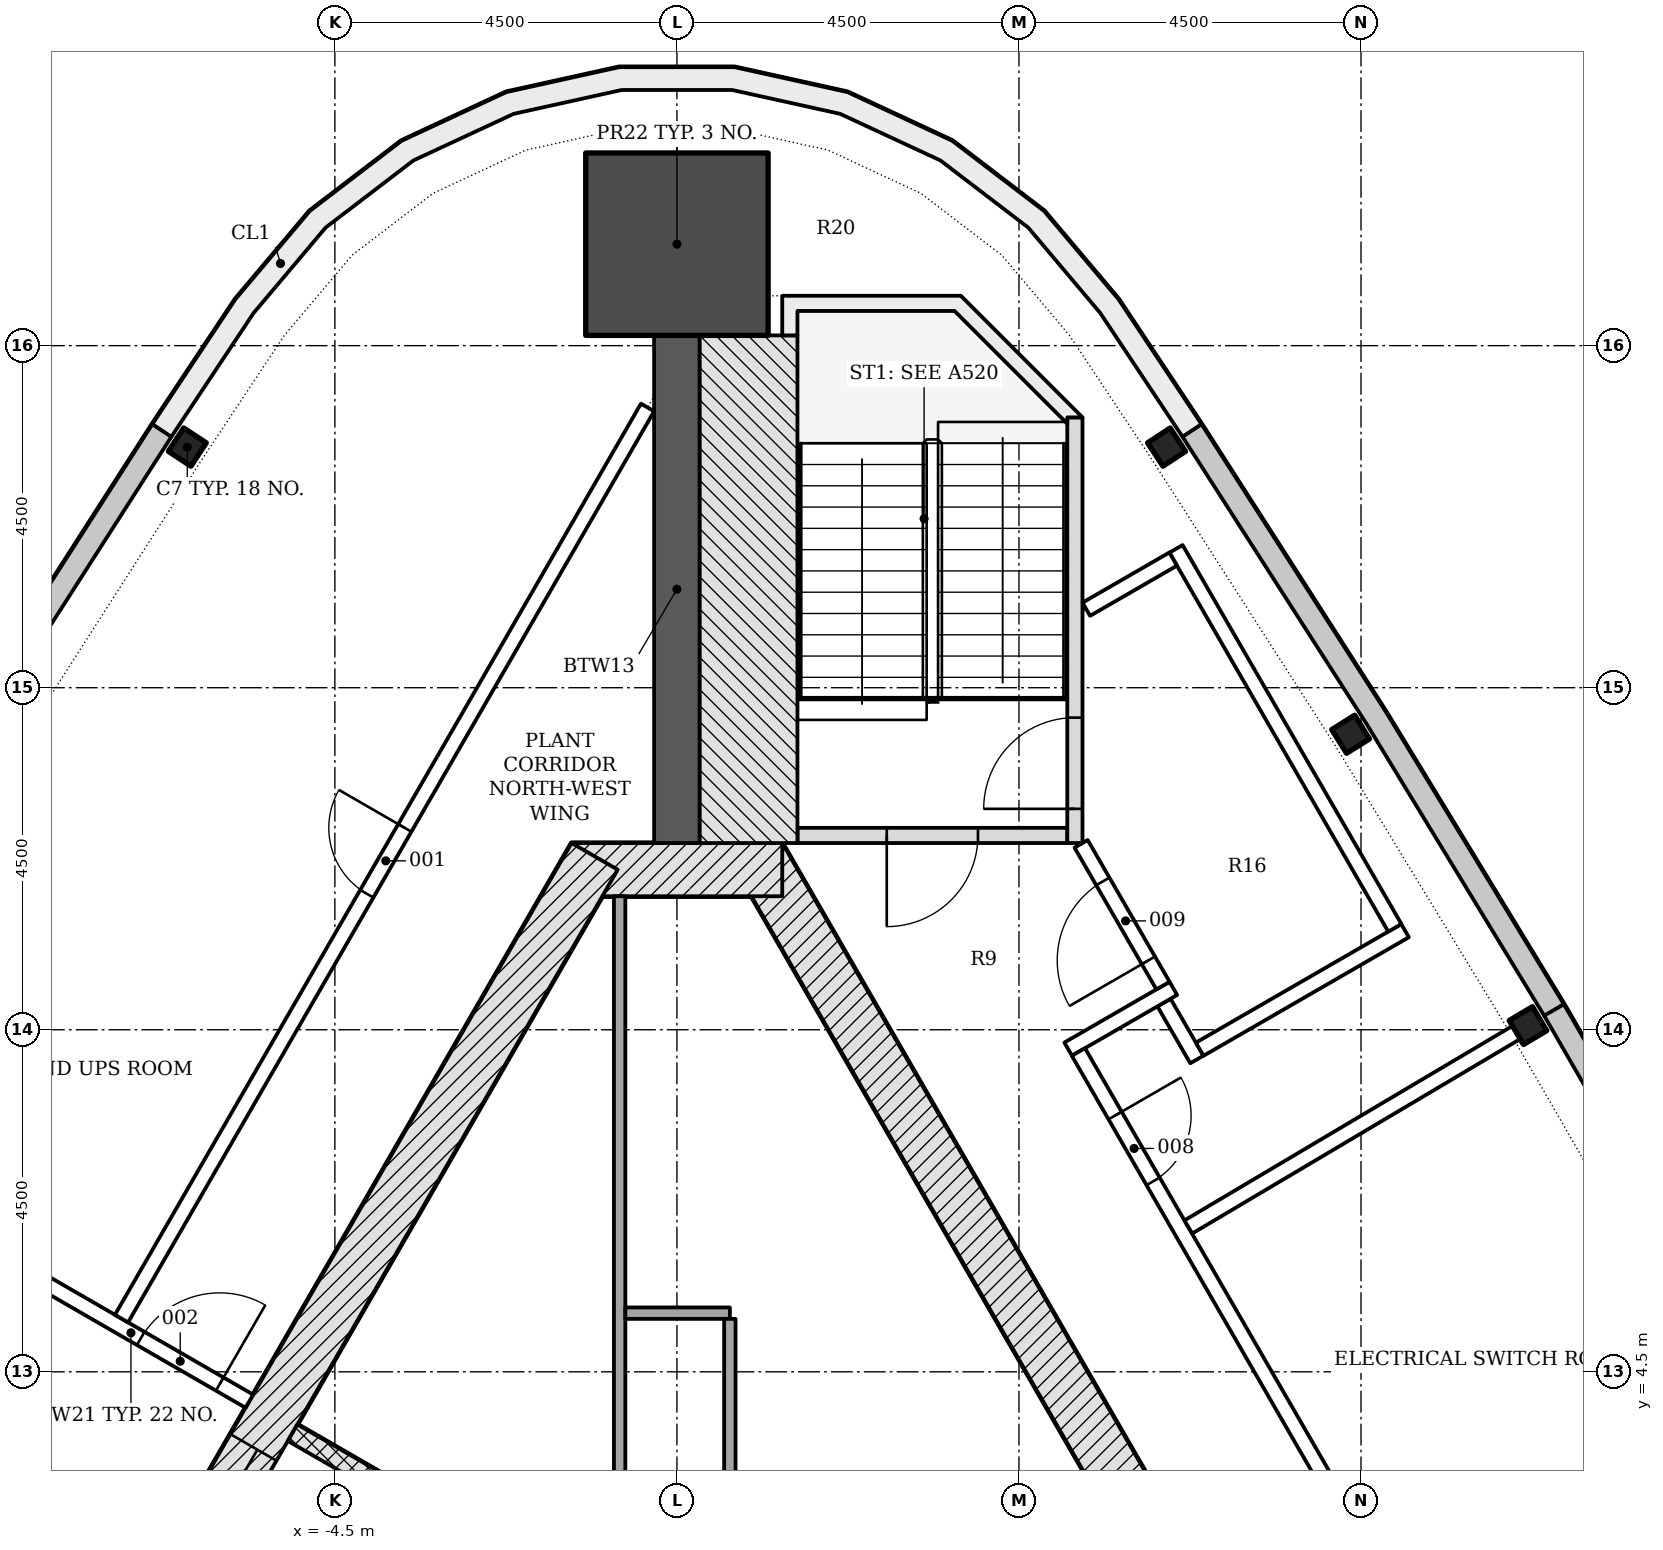
"""IFC4 building model, lengths in metres.
Left out: names, types, materials, properties, quantities, classifications, styles, units other than length and angle.
Written with IfcOpenShell. Run it as: python <this file> out.ifc"""

import sys

from ifc_helpers import new_model, si_unit, direction, frame, frame_2d, origin, origin_2d, place, context, subcontext, project, spatial, polyline, rectangle, i_section, outline, extrude, element, fill, save


model = new_model("IFC4")
c1 = context("Model", 3, precision=1e-05, world=origin(), true_north=direction((0.0, 1.0)))
c2 = subcontext(c1, "Body", "Model", "MODEL_VIEW")
j1 = project(units=[si_unit("LENGTHUNIT", "METRE"), si_unit("PLANEANGLEUNIT", "RADIAN")], contexts=[c1])
p1 = place(None, origin())
s1 = spatial("IfcSite", under=j1, at=p1, CompositionType="ELEMENT")
p2 = place(p1, origin())
s2 = spatial("IfcBuilding", under=s1, at=p2, CompositionType="ELEMENT")
p3 = place(p2, frame((0.0, 0.0, 279.6)))
s3 = spatial("IfcBuildingStorey", under=s2, at=p3, CompositionType="ELEMENT", Elevation=279.6)
p4 = place(p3, frame((10.311, -4.703, -0.25), z_axis=(0.0, 0.0, 1.0), x_axis=(-0.500001446645, 0.866024568562, 0.0)))
e1 = element("IfcWall", 1, at=p4, inside=s3, PredefinedType="SHEAR", context=c2, shape_type="SweptSolid", body=[
    extrude(rectangle(XDim=18.458, YDim=0.7, at=frame_2d((9.229, 0.0))), origin(), (0.0, 0.0, 1.0), 4.5),
])
p5 = place(p3, frame((1.386, 11.106, -0.25), z_axis=(0.0, 0.0, 1.0), x_axis=(-1.0, 0.0, 0.0)))
e2 = element("IfcWall", 2, at=p5, inside=s3, PredefinedType="SHEAR", context=c2, shape_type="SweptSolid", body=[
    extrude(rectangle(XDim=2.771, YDim=0.7, at=frame_2d((1.386, 0.0))), origin(), (0.0, 0.0, 1.0), 4.5),
])
p6 = place(p3, frame((-1.083, 11.281, -0.25), z_axis=(0.0, 0.0, 1.0), x_axis=(-0.500001446645, -0.866024568562, 0.0)))
e3 = element("IfcWall", 3, at=p6, inside=s3, PredefinedType="SHEAR", context=c2, shape_type="SweptSolid", body=[
    extrude(rectangle(XDim=18.458, YDim=0.7, at=frame_2d((9.229, 0.0))), origin(), (0.0, 0.0, 1.0), 4.5),
])
p7 = place(p6, frame((8.979, 0.0, 0.25)))
e4 = element("IfcOpeningElement", 4, at=p7, cuts=e3, PredefinedType="OPENING", context=c2, shape_type="SweptSolid", body=[
    extrude(rectangle(XDim=1.2, YDim=2.1, at=frame_2d((0.6, 1.05))), frame((0.0, 0.36, 0.0), z_axis=(0.0, -1.0, 0.0), x_axis=(1.0, 0.0, 0.0)), (0.0, 0.0, 1.0), 0.72),
])
p8 = place(p6, frame((11.029, 0.0, 0.25)))
e5 = element("IfcOpeningElement", 5, at=p8, cuts=e3, PredefinedType="OPENING", context=c2, shape_type="SweptSolid", body=[
    extrude(rectangle(XDim=1.2, YDim=2.1, at=frame_2d((0.6, 1.05))), frame((0.0, 0.36, 0.0), z_axis=(0.0, -1.0, 0.0), x_axis=(1.0, 0.0, 0.0)), (0.0, 0.0, 1.0), 0.72),
])
p9 = place(p3, frame((0.0, 11.456, -0.25), z_axis=(0.0, 0.0, 1.0), x_axis=(0.0, 1.0, 0.0)))
e6 = element("IfcWall", 6, at=p9, inside=s3, PredefinedType="SHEAR", context=c2, shape_type="SweptSolid", body=[
    extrude(rectangle(XDim=6.679, YDim=0.6, at=frame_2d((3.339, 0.0))), origin(), (0.0, 0.0, 1.0), 4.5),
])
p10 = place(p3, frame((0.0, 19.335, -0.25), z_axis=(0.0, 0.0, 1.0), x_axis=(0.0, 1.0, 0.0)))
e7 = element("IfcColumn", 7, at=p10, inside=s3, PredefinedType="COLUMN", context=c2, shape_type="SweptSolid", body=[
    extrude(rectangle(XDim=2.4, YDim=2.4, at=origin_2d()), origin(), (0.0, 0.0, 1.0), 4.5),
])
for number, where, z_axis, x_axis in (
    (8, (-6.442, 16.666, -0.25), (0.0, 0.0, 1.0), (-0.549, -0.836, 0.0)),
    (9, (11.196, 9.055, -0.25), (0.0, 0.0, 1.0), (-0.51, 0.86, 0.0)),
    (10, (8.863, 12.888, -0.25), (0.0, 0.0, 1.0), (-0.53, 0.848, 0.0)),
    (11, (6.442, 16.666, -0.25), (0.0, 0.0, 1.0), (-0.549, 0.836, 0.0)),
):
    element("IfcColumn", number, at=place(p3, frame(where, z_axis=z_axis, x_axis=x_axis)), inside=s3, PredefinedType="COLUMN", context=c2, shape_type="SweptSolid", body=[
        extrude(i_section(OverallWidth=0.368, OverallDepth=0.356, WebThickness=0.011, FlangeThickness=0.018, FilletRadius=0.015, at=origin_2d()), origin(), (0.0, 0.0, 1.0), 4.5),
    ])
p11 = place(p3, origin())
e12 = element("IfcWall", 12, at=p11, inside=s3, PredefinedType="NOTDEFINED", context=c2, shape_type="SweptSolid", body=[
    extrude(outline(polyline([(-6.901, 16.968), (-9.33, 13.179), (-11.669, 9.335), (-11.413, 9.179), (-9.075, 13.02), (-6.649, 16.806), (-6.901, 16.968)])), origin(), (0.0, 0.0, 1.0), 4.25),
])
p12 = place(p3, origin())
e13 = element("IfcWall", 13, at=p12, inside=s3, PredefinedType="NOTDEFINED", context=c2, shape_type="SweptSolid", body=[
    extrude(outline(polyline([(11.669, 9.335), (9.33, 13.179), (6.901, 16.968), (6.649, 16.806), (9.075, 13.02), (11.413, 9.179), (11.669, 9.335)])), origin(), (0.0, 0.0, 1.0), 4.25),
])
p13 = place(p3, origin())
e14 = element("IfcWall", 14, at=p13, inside=s3, PredefinedType="NOTDEFINED", context=c2, shape_type="SweptSolid", body=[
    extrude(outline(polyline([(13.919, 5.438), (11.669, 9.335), (11.409, 9.185), (13.659, 5.288), (13.919, 5.438)])), origin(), (0.0, 0.0, 1.0), 1.2),
])
p14 = place(p3, origin())
e15 = element("IfcWall", 15, at=p14, inside=s3, PredefinedType="NOTDEFINED", context=c2, shape_type="SweptSolid", body=[
    extrude(outline(polyline([(6.901, 16.968), (5.81, 18.61), (4.83, 19.771), (3.623, 20.695), (2.244, 21.335), (0.76, 21.664), (-0.76, 21.664), (-2.244, 21.335), (-3.623, 20.695), (-4.83, 19.771), (-5.81, 18.61), (-6.901, 16.968), (-6.651, 16.802), (-5.569, 18.429), (-4.622, 19.553), (-3.466, 20.437), (-2.147, 21.05), (-0.727, 21.364), (0.727, 21.364), (2.147, 21.05), (3.466, 20.437), (4.622, 19.553), (5.569, 18.429), (6.651, 16.802), (6.901, 16.968)])), origin(), (0.0, 0.0, 1.0), 4.25),
])
p15 = place(p3, frame((-5.056, 3.699, -0.25), z_axis=(0.0, 0.0, 1.0), x_axis=(0.866032775405, -0.499987231761, 0.0)))
e16 = element("IfcWall", 16, at=p15, inside=s3, PredefinedType="PARTITIONING", context=c2, shape_type="SweptSolid", body=[
    extrude(rectangle(XDim=2.9, YDim=0.25, at=frame_2d((1.45, 0.0))), origin(), (0.0, 0.0, 1.0), 4.5),
])
p16 = place(p3, frame((-0.754, 10.756, 0.0), z_axis=(0.0, 0.0, 1.0), x_axis=(0.0, -1.0, 0.0)))
e17 = element("IfcWall", 17, at=p16, inside=s3, PredefinedType="PARTITIONING", context=c2, shape_type="SweptSolid", body=[
    extrude(rectangle(XDim=16.985, YDim=0.15, at=frame_2d((8.492, 0.0))), origin(), (0.0, 0.0, 1.0), 4.25),
])
p17 = place(p16, frame((9.185, 0.0, 0.0)))
e18 = element("IfcOpeningElement", 18, at=p17, cuts=e17, PredefinedType="OPENING", context=c2, shape_type="SweptSolid", body=[
    extrude(rectangle(XDim=0.9, YDim=2.1, at=frame_2d((0.45, 1.05))), frame((0.0, 0.085, 0.0), z_axis=(0.0, -1.0, 0.0), x_axis=(1.0, 0.0, 0.0)), (0.0, 0.0, 1.0), 0.17),
])
p18 = place(p3, frame((-0.679, 5.272, 0.0), z_axis=(0.0, 0.0, 1.0), x_axis=(1.0, 0.0, 0.0)))
e19 = element("IfcWall", 19, at=p18, inside=s3, PredefinedType="PARTITIONING", context=c2, shape_type="SweptSolid", body=[
    extrude(rectangle(XDim=1.375, YDim=0.15, at=frame_2d((0.688, 0.0))), origin(), (0.0, 0.0, 1.0), 4.25),
])
p19 = place(p3, frame((0.696, 5.197, 0.0), z_axis=(0.0, 0.0, 1.0), x_axis=(0.0, -1.0, 0.0)))
e20 = element("IfcWall", 20, at=p19, inside=s3, PredefinedType="PARTITIONING", context=c2, shape_type="SweptSolid", body=[
    extrude(rectangle(XDim=11.425, YDim=0.15, at=frame_2d((5.712, 0.0))), origin(), (0.0, 0.0, 1.0), 4.25),
])
p20 = place(p19, frame((3.664, 0.0, 0.0)))
e21 = element("IfcOpeningElement", 21, at=p20, cuts=e20, PredefinedType="OPENING", context=c2, shape_type="SweptSolid", body=[
    extrude(rectangle(XDim=0.9, YDim=2.1, at=frame_2d((0.45, 1.05))), frame((0.0, 0.085, 0.0), z_axis=(0.0, -1.0, 0.0), x_axis=(1.0, 0.0, 0.0)), (0.0, 0.0, 1.0), 0.17),
])
p21 = place(p3, frame((5.135, 11.556, -0.25), z_axis=(0.0, 0.0, 1.0), x_axis=(-1.0, 0.0, 0.0)))
e22 = element("IfcWall", 22, at=p21, inside=s3, PredefinedType="SHEAR", context=c2, shape_type="SweptSolid", body=[
    extrude(rectangle(XDim=3.55, YDim=0.2, at=frame_2d((1.775, 0.0))), origin(), (0.0, 0.0, 1.0), 4.5),
])
p22 = place(p21, frame((1.175, 0.0, 0.25)))
e23 = element("IfcOpeningElement", 23, at=p22, cuts=e22, PredefinedType="OPENING", context=c2, shape_type="SweptSolid", body=[
    extrude(rectangle(XDim=1.2, YDim=2.1, at=frame_2d((0.6, 1.05))), frame((0.0, 0.11, 0.0), z_axis=(0.0, -1.0, 0.0), x_axis=(1.0, 0.0, 0.0)), (0.0, 0.0, 1.0), 0.22),
])
p23 = place(p3, frame((5.236, 11.456, -0.25), z_axis=(0.0, 0.0, 1.0), x_axis=(0.0, 1.0, 0.0)))
e24 = element("IfcWall", 24, at=p23, inside=s3, PredefinedType="SHEAR", context=c2, shape_type="SweptSolid", body=[
    extrude(rectangle(XDim=5.6, YDim=0.2, at=frame_2d((2.8, 0.0))), origin(), (0.0, 0.0, 1.0), 4.5),
])
p24 = place(p23, frame((0.45, 0.0, 0.25)))
e25 = element("IfcOpeningElement", 25, at=p24, cuts=e24, PredefinedType="OPENING", context=c2, shape_type="SweptSolid", body=[
    extrude(rectangle(XDim=1.2, YDim=2.1, at=frame_2d((0.6, 1.05))), frame((0.0, 0.11, 0.0), z_axis=(0.0, -1.0, 0.0), x_axis=(1.0, 0.0, 0.0)), (0.0, 0.0, 1.0), 0.22),
])
p25 = place(p3, frame((0.943, 11.456, -0.25), z_axis=(0.0, 0.0, 1.0), x_axis=(0.0, 1.0, 0.0)))
e26 = element("IfcWall", 26, at=p25, inside=s3, PredefinedType="SHEAR", context=c2, shape_type="SweptSolid", body=[
    extrude(rectangle(XDim=6.679, YDim=1.286, at=frame_2d((3.339, 0.0))), origin(), (0.0, 0.0, 1.0), 4.5),
])
p26 = place(p3, frame((0.0, 0.0, -0.25)))
e27 = element("IfcWall", 27, at=p26, inside=s3, PredefinedType="SHEAR", context=c2, shape_type="SweptSolid", body=[
    extrude(outline(polyline([(5.336, 17.056), (3.736, 18.656), (1.385, 18.656), (1.385, 18.135), (1.586, 18.135), (1.586, 18.456), (3.653, 18.456), (5.135, 16.974), (5.135, 17.056), (5.135, 17.056), (5.135, 17.056), (5.135, 17.056), (5.135, 17.056), (5.135, 17.056), (5.135, 17.056), (5.135, 17.056), (5.135, 17.056), (5.135, 17.056), (5.135, 17.056), (5.135, 17.056), (5.135, 17.056), (5.135, 17.056), (5.135, 17.056), (5.135, 17.056), (5.135, 17.056), (5.336, 17.056)])), origin(), (0.0, 0.0, 1.0), 4.5),
])
p27 = place(p3, frame((-8.741, 5.913, 0.0), z_axis=(0.0, 0.0, 1.0), x_axis=(0.866017220491, -0.500014173611, 0.0)))
e28 = element("IfcWall", 28, at=p27, inside=s3, PredefinedType="PARTITIONING", context=c2, shape_type="SweptSolid", body=[
    extrude(rectangle(XDim=3.598, YDim=0.2, at=frame_2d((1.799, 0.0))), origin(), (0.0, 0.0, 1.0), 4.25),
])
p28 = place(p27, frame((1.948, 0.0, 0.0)))
e29 = element("IfcOpeningElement", 29, at=p28, cuts=e28, PredefinedType="OPENING", context=c2, shape_type="SweptSolid", body=[
    extrude(rectangle(XDim=1.2, YDim=2.1, at=frame_2d((0.6, 1.05))), frame((0.0, 0.11, 0.0), z_axis=(0.0, -1.0, 0.0), x_axis=(1.0, 0.0, 0.0)), (0.0, 0.0, 1.0), 0.22),
])
p29 = place(p3, frame((-7.307, 5.2, 0.0), z_axis=(0.0, 0.0, 1.0), x_axis=(0.49999780173, 0.866026672953, 0.0)))
e30 = element("IfcWall", 30, at=p29, inside=s3, PredefinedType="PARTITIONING", context=c2, shape_type="SweptSolid", body=[
    extrude(rectangle(XDim=13.841, YDim=0.2, at=frame_2d((6.92, 0.0))), origin(), (0.0, 0.0, 1.0), 3.702),
])
p30 = place(p29, frame((6.454, 0.0, 0.0)))
e31 = element("IfcOpeningElement", 31, at=p30, cuts=e30, PredefinedType="OPENING", context=c2, shape_type="SweptSolid", body=[
    extrude(rectangle(XDim=1.0, YDim=2.1, at=frame_2d((0.5, 1.05))), frame((0.0, 0.11, 0.0), z_axis=(0.0, -1.0, 0.0), x_axis=(1.0, 0.0, 0.0)), (0.0, 0.0, 1.0), 0.22),
])
p31 = place(p3, frame((6.408, 9.358, 0.0), z_axis=(0.0, 0.0, 1.0), x_axis=(0.49996696679, -0.866044474677, 0.0)))
e32 = element("IfcWall", 32, at=p31, inside=s3, PredefinedType="PARTITIONING", context=c2, shape_type="SweptSolid", body=[
    extrude(rectangle(XDim=0.864, YDim=0.2, at=frame_2d((0.432, 0.0))), origin(), (0.0, 0.0, 1.0), 4.25),
])
p32 = place(p3, frame((5.147, 8.745, 0.0), z_axis=(0.0, 0.0, 1.0), x_axis=(0.865987117328, 0.500066308224, 0.0)))
e33 = element("IfcWall", 33, at=p32, inside=s3, PredefinedType="PARTITIONING", context=c2, shape_type="SweptSolid", body=[
    extrude(rectangle(XDim=1.598, YDim=0.2, at=frame_2d((0.799, 0.0))), origin(), (0.0, 0.0, 1.0), 4.25),
])
p33 = place(p3, frame((6.395, 9.581, 0.0), z_axis=(0.0, 0.0, 1.0), x_axis=(-0.500003735859, 0.866023246874, 0.0)))
e34 = element("IfcWall", 34, at=p33, inside=s3, PredefinedType="PARTITIONING", context=c2, shape_type="SweptSolid", body=[
    extrude(rectangle(XDim=2.154, YDim=0.2, at=frame_2d((1.077, 0.0))), origin(), (0.0, 0.0, 1.0), 3.702),
])
p34 = place(p33, frame((0.383, 0.0, 0.0)))
e35 = element("IfcOpeningElement", 35, at=p34, cuts=e34, PredefinedType="OPENING", context=c2, shape_type="SweptSolid", body=[
    extrude(rectangle(XDim=1.2, YDim=2.1, at=frame_2d((0.6, 1.05))), frame((0.0, 0.11, 0.0), z_axis=(0.0, -1.0, 0.0), x_axis=(1.0, 0.0, 0.0)), (0.0, 0.0, 1.0), 0.22),
])
p35 = place(p3, frame((5.282, 8.708, 0.0), z_axis=(0.0, 0.0, 1.0), x_axis=(0.500001848211, -0.866024336717, 0.0)))
e36 = element("IfcWall", 36, at=p35, inside=s3, PredefinedType="PARTITIONING", context=c2, shape_type="SweptSolid", body=[
    extrude(rectangle(XDim=19.591, YDim=0.2, at=frame_2d((9.795, 0.0))), origin(), (0.0, 0.0, 1.0), 3.702),
])
p36 = place(p35, frame((10.741, 0.0, 0.0)))
e37 = element("IfcOpeningElement", 37, at=p36, cuts=e36, PredefinedType="OPENING", context=c2, shape_type="SweptSolid", body=[
    extrude(rectangle(XDim=1.0, YDim=2.1, at=frame_2d((0.5, 1.05))), frame((0.0, 0.11, 0.0), z_axis=(0.0, -1.0, 0.0), x_axis=(1.0, 0.0, 0.0)), (0.0, 0.0, 1.0), 0.22),
])
p37 = place(p35, frame((0.965, 0.0, 0.0)))
e38 = element("IfcOpeningElement", 38, at=p37, cuts=e36, PredefinedType="OPENING", context=c2, shape_type="SweptSolid", body=[
    extrude(rectangle(XDim=1.0, YDim=2.1, at=frame_2d((0.5, 1.05))), frame((0.0, 0.11, 0.0), z_axis=(0.0, -1.0, 0.0), x_axis=(1.0, 0.0, 0.0)), (0.0, 0.0, 1.0), 0.22),
])
p38 = place(p3, frame((6.728, 6.406, 0.0), z_axis=(0.0, 0.0, 1.0), x_axis=(0.860154706705, 0.510033215128, 0.0)))
e39 = element("IfcWall", 39, at=p38, inside=s3, PredefinedType="PARTITIONING", context=c2, shape_type="SweptSolid", body=[
    extrude(rectangle(XDim=5.044, YDim=0.2, at=frame_2d((2.522, 0.0))), origin(), (0.0, 0.0, 1.0), 3.702),
])
p39 = place(p3, frame((6.878, 8.744, 0.0), z_axis=(0.0, 0.0, 1.0), x_axis=(0.866023983177, 0.500002460556, 0.0)))
e40 = element("IfcWall", 40, at=p39, inside=s3, PredefinedType="PARTITIONING", context=c2, shape_type="SweptSolid", body=[
    extrude(rectangle(XDim=3.12, YDim=0.2, at=frame_2d((1.56, 0.0))), origin(), (0.0, 0.0, 1.0), 4.25),
])
p40 = place(p3, frame((6.566, 15.327, 0.0), z_axis=(0.0, 0.0, 1.0), x_axis=(0.499997778408, -0.866026686418, 0.0)))
e41 = element("IfcWall", 41, at=p40, inside=s3, PredefinedType="PARTITIONING", context=c2, shape_type="SweptSolid", body=[
    extrude(rectangle(XDim=5.757, YDim=0.2, at=frame_2d((2.878, 0.0))), origin(), (0.0, 0.0, 1.0), 3.702),
])
p41 = place(p3, frame((6.529, 15.192, 0.0), z_axis=(0.0, 0.0, 1.0), x_axis=(-0.866117824122, -0.499839889103, 0.0)))
e42 = element("IfcWall", 42, at=p41, inside=s3, PredefinedType="PARTITIONING", context=c2, shape_type="SweptSolid", body=[
    extrude(rectangle(XDim=1.32, YDim=0.2, at=frame_2d((0.66, 0.0))), origin(), (0.0, 0.0, 1.0), 4.25),
])
p42 = place(p7, origin())
e43 = element("IfcDoor", 43, at=p42, inside=s3, OperationType="DOUBLE_DOOR_SLIDING", PredefinedType="DOOR", context=c2, shape_type="SweptSolid", body=[
    extrude(rectangle(XDim=1.2, YDim=2.1, at=frame_2d((0.6, 1.05))), frame((0.0, 0.025, 0.0), z_axis=(0.0, -1.0, 0.0), x_axis=(1.0, 0.0, 0.0)), (0.0, 0.0, 1.0), 0.05),
])
fill(e4, e43)
p43 = place(p22, origin())
e44 = element("IfcDoor", 44, at=p43, inside=s3, OperationType="SINGLE_SWING_RIGHT", PredefinedType="DOOR", context=c2, shape_type="SweptSolid", body=[
    extrude(rectangle(XDim=1.2, YDim=2.1, at=frame_2d((0.6, 1.05))), frame((0.0, 0.025, 0.0), z_axis=(0.0, -1.0, 0.0), x_axis=(1.0, 0.0, 0.0)), (0.0, 0.0, 1.0), 0.05),
])
fill(e23, e44)
p44 = place(p24, origin())
e45 = element("IfcDoor", 45, at=p44, inside=s3, OperationType="SINGLE_SWING_LEFT", PredefinedType="DOOR", context=c2, shape_type="SweptSolid", body=[
    extrude(rectangle(XDim=1.2, YDim=2.1, at=frame_2d((0.6, 1.05))), frame((0.0, 0.025, 0.0), z_axis=(0.0, -1.0, 0.0), x_axis=(1.0, 0.0, 0.0)), (0.0, 0.0, 1.0), 0.05),
])
fill(e25, e45)
p45 = place(p30, origin())
e46 = element("IfcDoor", 46, at=p45, inside=s3, OperationType="SINGLE_SWING_RIGHT", PredefinedType="DOOR", context=c2, shape_type="SweptSolid", body=[
    extrude(rectangle(XDim=1.0, YDim=2.1, at=frame_2d((0.5, 1.05))), frame((0.0, 0.025, 0.0), z_axis=(0.0, -1.0, 0.0), x_axis=(1.0, 0.0, 0.0)), (0.0, 0.0, 1.0), 0.05),
])
fill(e31, e46)
p46 = place(p28, origin())
e47 = element("IfcDoor", 47, at=p46, inside=s3, OperationType="SINGLE_SWING_RIGHT", PredefinedType="DOOR", context=c2, shape_type="SweptSolid", body=[
    extrude(rectangle(XDim=1.2, YDim=2.1, at=frame_2d((0.6, 1.05))), frame((0.0, 0.025, 0.0), z_axis=(0.0, -1.0, 0.0), x_axis=(1.0, 0.0, 0.0)), (0.0, 0.0, 1.0), 0.05),
])
fill(e29, e47)
p47 = place(p37, origin())
e48 = element("IfcDoor", 48, at=p47, inside=s3, OperationType="SINGLE_SWING_LEFT", PredefinedType="DOOR", context=c2, shape_type="SweptSolid", body=[
    extrude(rectangle(XDim=1.0, YDim=2.1, at=frame_2d((0.5, 1.05))), frame((0.0, 0.025, 0.0), z_axis=(0.0, -1.0, 0.0), x_axis=(1.0, 0.0, 0.0)), (0.0, 0.0, 1.0), 0.05),
])
fill(e38, e48)
p48 = place(p34, origin())
e49 = element("IfcDoor", 49, at=p48, inside=s3, OperationType="SINGLE_SWING_LEFT", PredefinedType="DOOR", context=c2, shape_type="SweptSolid", body=[
    extrude(rectangle(XDim=1.2, YDim=2.1, at=frame_2d((0.6, 1.05))), frame((0.0, 0.025, 0.0), z_axis=(0.0, -1.0, 0.0), x_axis=(1.0, 0.0, 0.0)), (0.0, 0.0, 1.0), 0.05),
])
fill(e35, e49)
save(model, sys.argv[1])
